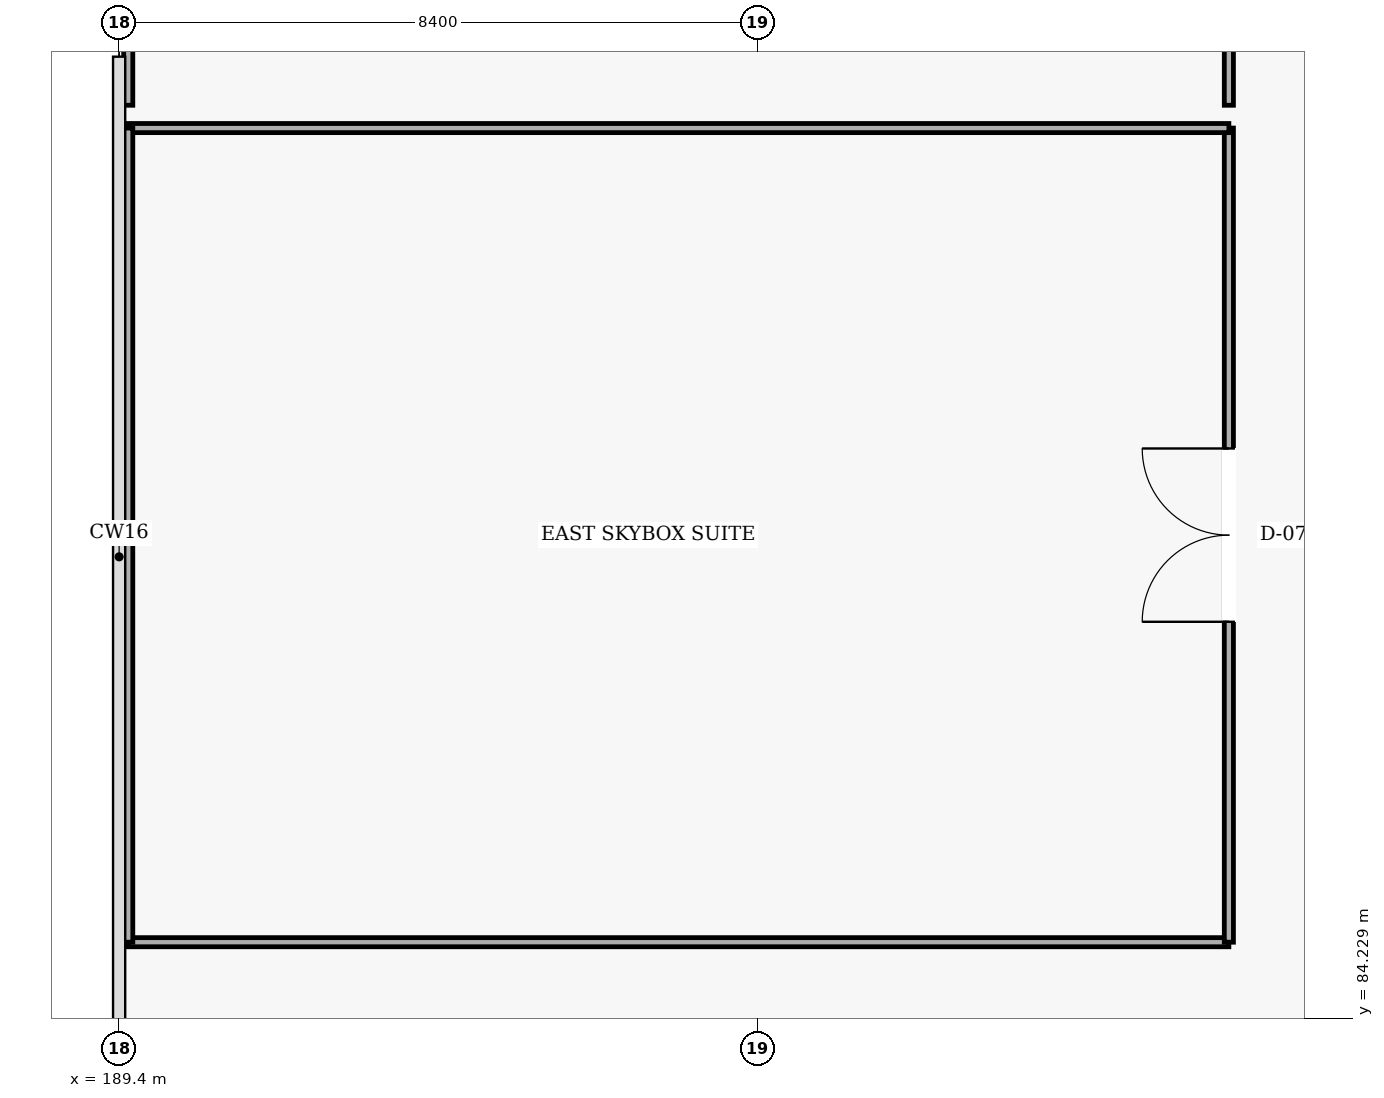
"""IFC4 building model, lengths in metres.
Left out: names, types, materials, properties, quantities, classifications, styles, units other than length and angle.
Written with IfcOpenShell. Run it as: python <this file> out.ifc"""

import sys

from ifc_helpers import new_model, si_unit, direction, frame, frame_2d, origin, place, context, subcontext, project, spatial, rectangle, extrude, element, fill, save


model = new_model("IFC4")
c1 = context("Model", 3, precision=1e-05, world=origin(), true_north=direction((0.0, 1.0)))
c2 = subcontext(c1, "Body", "Model", "MODEL_VIEW")
j1 = project(units=[si_unit("LENGTHUNIT", "METRE"), si_unit("PLANEANGLEUNIT", "RADIAN")], contexts=[c1])
p1 = place(None, origin())
s1 = spatial("IfcSite", under=j1, at=p1, CompositionType="ELEMENT")
p2 = place(p1, origin())
s2 = spatial("IfcBuilding", under=s1, at=p2, CompositionType="ELEMENT")
p3 = place(p2, frame((0.0, 0.0, 19.8)))
s3 = spatial("IfcBuildingStorey", under=s2, at=p3, CompositionType="ELEMENT", Elevation=19.8)
p4 = place(p3, frame((189.52, 85.23, 0.0), z_axis=(0.0, 0.0, 1.0), x_axis=(1.0, 0.0, 0.0)))
e1 = element("IfcWall", 1, at=p4, inside=s3, PredefinedType="PARTITIONING", context=c2, shape_type="SweptSolid", body=[
    extrude(rectangle(XDim=14.48, YDim=0.12, at=frame_2d((7.24, 0.0))), origin(), (0.0, 0.0, 1.0), 4.5),
])
p5 = place(p3, frame((204.0, 85.23, 0.0), z_axis=(0.0, 0.0, 1.0), x_axis=(0.0, 1.0, 0.0)))
e2 = element("IfcWall", 2, at=p5, inside=s3, PredefinedType="PARTITIONING", context=c2, shape_type="SweptSolid", body=[
    extrude(rectangle(XDim=10.711, YDim=0.12, at=frame_2d((5.355, 0.0))), origin(), (0.0, 0.0, 1.0), 4.5),
])
p6 = place(p5, frame((4.215, 0.0, 0.0)))
e3 = element("IfcOpeningElement", 3, at=p6, cuts=e2, PredefinedType="OPENING", context=c2, shape_type="SweptSolid", body=[
    extrude(rectangle(XDim=2.28, YDim=2.4, at=frame_2d((1.14, 1.2))), frame((0.0, 0.07, 0.0), z_axis=(0.0, -1.0, 0.0), x_axis=(1.0, 0.0, 0.0)), (0.0, 0.0, 1.0), 0.14),
])
p7 = place(p3, frame((204.0, 95.941, 0.0), z_axis=(0.0, 0.0, 1.0), x_axis=(-1.0, 0.0, 0.0)))
e4 = element("IfcWall", 4, at=p7, inside=s3, PredefinedType="PARTITIONING", context=c2, shape_type="SweptSolid", body=[
    extrude(rectangle(XDim=14.48, YDim=0.12, at=frame_2d((7.24, 0.0))), origin(), (0.0, 0.0, 1.0), 4.5),
])
p8 = place(p3, frame((189.52, 95.941, 0.0), z_axis=(0.0, 0.0, 1.0), x_axis=(0.0, -1.0, 0.0)))
e5 = element("IfcWall", 5, at=p8, inside=s3, PredefinedType="PARTITIONING", context=c2, shape_type="SweptSolid", body=[
    extrude(rectangle(XDim=10.711, YDim=0.12, at=frame_2d((5.355, 0.0))), origin(), (0.0, 0.0, 1.0), 4.5),
])
p9 = place(p3, frame((204.0, 96.241, 0.0), z_axis=(0.0, 0.0, 1.0), x_axis=(0.0, 1.0, 0.0)))
e6 = element("IfcWall", 6, at=p9, inside=s3, PredefinedType="PARTITIONING", context=c2, shape_type="SweptSolid", body=[
    extrude(rectangle(XDim=14.809, YDim=0.12, at=frame_2d((7.405, 0.0))), origin(), (0.0, 0.0, 1.0), 4.5),
])
p10 = place(p9, frame((6.225, 0.0, 0.0)))
e7 = element("IfcOpeningElement", 7, at=p10, cuts=e6, PredefinedType="OPENING", context=c2, shape_type="SweptSolid", body=[
    extrude(rectangle(XDim=2.36, YDim=2.4, at=frame_2d((1.18, 1.2))), frame((0.0, 0.07, 0.0), z_axis=(0.0, -1.0, 0.0), x_axis=(1.0, 0.0, 0.0)), (0.0, 0.0, 1.0), 0.14),
])
p11 = place(p3, frame((189.52, 111.05, 0.0), z_axis=(0.0, 0.0, 1.0), x_axis=(0.0, -1.0, 0.0)))
e8 = element("IfcWall", 8, at=p11, inside=s3, PredefinedType="PARTITIONING", context=c2, shape_type="SweptSolid", body=[
    extrude(rectangle(XDim=14.809, YDim=0.12, at=frame_2d((7.405, 0.0))), origin(), (0.0, 0.0, 1.0), 4.5),
])
p12 = place(p6, origin())
e9 = element("IfcDoor", 9, at=p12, inside=s3, OperationType="DOUBLE_DOOR_SINGLE_SWING", PredefinedType="DOOR", context=c2, shape_type="SweptSolid", body=[
    extrude(rectangle(XDim=2.28, YDim=2.4, at=frame_2d((1.14, 1.2))), frame((0.0, 0.025, 0.0), z_axis=(0.0, -1.0, 0.0), x_axis=(1.0, 0.0, 0.0)), (0.0, 0.0, 1.0), 0.05),
])
fill(e3, e9)
save(model, sys.argv[1])
